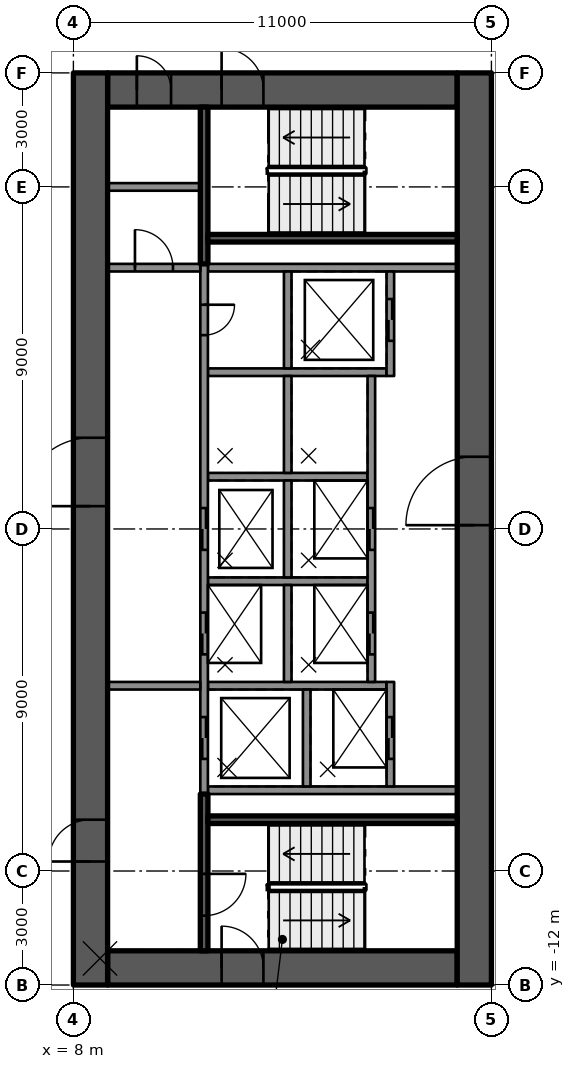
"""IFC4 building model, lengths in metres.
Left out: names, types, materials, properties, quantities, classifications, styles, units other than length and angle.
Written with IfcOpenShell. Run it as: python <this file> out.ifc"""

import sys

from ifc_helpers import new_model, si_unit, direction, frame, frame_2d, origin, place, context, subcontext, project, spatial, rectangle, extrude, element, fill, save


model = new_model("IFC4")
c1 = context("Model", 3, precision=1e-05, world=origin(), true_north=direction((0.0, 1.0)))
c2 = subcontext(c1, "Body", "Model", "MODEL_VIEW")
j1 = project(units=[si_unit("LENGTHUNIT", "METRE"), si_unit("PLANEANGLEUNIT", "RADIAN")], contexts=[c1])
p1 = place(None, origin())
s1 = spatial("IfcSite", under=j1, at=p1, CompositionType="ELEMENT")
p2 = place(p1, origin())
s2 = spatial("IfcBuilding", under=s1, at=p2, CompositionType="ELEMENT")
p3 = place(p2, frame((0.0, 0.0, 62.3)))
s3 = spatial("IfcBuildingStorey", under=s2, at=p3, CompositionType="ELEMENT", Elevation=62.3)
p4 = place(p3, frame((8.9, 11.55, 0.0), z_axis=(0.0, 0.0, 1.0), x_axis=(1.0, 0.0, 0.0)))
e1 = element("IfcWall", 1, at=p4, inside=s3, PredefinedType="SHEAR", context=c2, shape_type="SweptSolid", body=[
    extrude(rectangle(XDim=9.2, YDim=0.9, at=frame_2d((4.6, 0.0))), origin(), (0.0, 0.0, 1.0), 3.5),
])
p5 = place(p4, frame((3.0, 0.0, 0.0)))
e2 = element("IfcOpeningElement", 2, at=p5, cuts=e1, PredefinedType="OPENING", context=c2, shape_type="SweptSolid", body=[
    extrude(rectangle(XDim=1.1, YDim=2.1, at=frame_2d((0.55, 1.05))), frame((0.0, 0.46, 0.0), z_axis=(0.0, -1.0, 0.0), x_axis=(1.0, 0.0, 0.0)), (0.0, 0.0, 1.0), 0.92),
])
p6 = place(p4, frame((0.77, 0.0, 0.0)))
e3 = element("IfcOpeningElement", 3, at=p6, cuts=e1, PredefinedType="OPENING", context=c2, shape_type="SweptSolid", body=[
    extrude(rectangle(XDim=0.9, YDim=2.1, at=frame_2d((0.45, 1.05))), frame((0.0, 0.46, 0.0), z_axis=(0.0, -1.0, 0.0), x_axis=(1.0, 0.0, 0.0)), (0.0, 0.0, 1.0), 0.92),
])
p7 = place(p3, frame((8.9, -11.55, 0.0), z_axis=(0.0, 0.0, 1.0), x_axis=(1.0, 0.0, 0.0)))
e4 = element("IfcWall", 4, at=p7, inside=s3, PredefinedType="SHEAR", context=c2, shape_type="SweptSolid", body=[
    extrude(rectangle(XDim=9.2, YDim=0.9, at=frame_2d((4.6, 0.0))), origin(), (0.0, 0.0, 1.0), 3.5),
])
p8 = place(p7, frame((3.0, 0.0, 0.0)))
e5 = element("IfcOpeningElement", 5, at=p8, cuts=e4, PredefinedType="OPENING", context=c2, shape_type="SweptSolid", body=[
    extrude(rectangle(XDim=1.1, YDim=2.1, at=frame_2d((0.55, 1.05))), frame((0.0, 0.46, 0.0), z_axis=(0.0, -1.0, 0.0), x_axis=(1.0, 0.0, 0.0)), (0.0, 0.0, 1.0), 0.92),
])
p9 = place(p3, frame((8.45, -12.0, 0.0), z_axis=(0.0, 0.0, 1.0), x_axis=(0.0, 1.0, 0.0)))
e6 = element("IfcWall", 6, at=p9, inside=s3, PredefinedType="SHEAR", context=c2, shape_type="SweptSolid", body=[
    extrude(rectangle(XDim=24.0, YDim=0.9, at=frame_2d((12.0, 0.0))), origin(), (0.0, 0.0, 1.0), 3.5),
])
p10 = place(p9, frame((12.6, 0.0, 0.0)))
e7 = element("IfcOpeningElement", 7, at=p10, cuts=e6, PredefinedType="OPENING", context=c2, shape_type="SweptSolid", body=[
    extrude(rectangle(XDim=1.8, YDim=2.1, at=frame_2d((0.9, 1.05))), frame((0.0, 0.46, 0.0), z_axis=(0.0, -1.0, 0.0), x_axis=(1.0, 0.0, 0.0)), (0.0, 0.0, 1.0), 0.92),
])
p11 = place(p9, frame((3.25, 0.0, 0.0)))
e8 = element("IfcOpeningElement", 8, at=p11, cuts=e6, PredefinedType="OPENING", context=c2, shape_type="SweptSolid", body=[
    extrude(rectangle(XDim=1.1, YDim=2.1, at=frame_2d((0.55, 1.05))), frame((0.0, 0.46, 0.0), z_axis=(0.0, -1.0, 0.0), x_axis=(1.0, 0.0, 0.0)), (0.0, 0.0, 1.0), 0.92),
])
p12 = place(p3, frame((18.55, -12.0, 0.0), z_axis=(0.0, 0.0, 1.0), x_axis=(0.0, 1.0, 0.0)))
e9 = element("IfcWall", 9, at=p12, inside=s3, PredefinedType="SHEAR", context=c2, shape_type="SweptSolid", body=[
    extrude(rectangle(XDim=24.0, YDim=0.9, at=frame_2d((12.0, 0.0))), origin(), (0.0, 0.0, 1.0), 3.5),
])
p13 = place(p12, frame((12.1, 0.0, 0.0)))
e10 = element("IfcOpeningElement", 10, at=p13, cuts=e9, PredefinedType="OPENING", context=c2, shape_type="SweptSolid", body=[
    extrude(rectangle(XDim=1.8, YDim=2.1, at=frame_2d((0.9, 1.05))), frame((0.0, 0.46, 0.0), z_axis=(0.0, -1.0, 0.0), x_axis=(1.0, 0.0, 0.0)), (0.0, 0.0, 1.0), 0.92),
])
for number, where, z_axis, x_axis in (
    (11, (11.54, -6.875, 0.0), (0.0, 0.0, 1.0), (1.0, 0.0, 0.0)),
    (12, (11.54, 6.875, 0.0), (0.0, 0.0, 1.0), (1.0, 0.0, 0.0)),
):
    element("IfcWall", number, at=place(p3, frame(where, z_axis=z_axis, x_axis=x_axis)), inside=s3, PredefinedType="SOLIDWALL", context=c2, shape_type="SweptSolid", body=[
        extrude(rectangle(XDim=6.56, YDim=0.2, at=frame_2d((3.28, 0.0))), origin(), (0.0, 0.0, 1.0), 3.09),
    ])
p14 = place(p3, frame((11.54, 4.125, 0.0), z_axis=(0.0, 0.0, 1.0), x_axis=(1.0, 0.0, 0.0)))
e13 = element("IfcWall", 13, at=p14, inside=s3, PredefinedType="SOLIDWALL", context=c2, shape_type="SweptSolid", body=[
    extrude(rectangle(XDim=4.7, YDim=0.2, at=frame_2d((2.35, 0.0))), origin(), (0.0, 0.0, 1.0), 3.09),
])
for number, where, z_axis, x_axis in (
    (14, (11.54, 1.375, 0.0), (0.0, 0.0, 1.0), (1.0, 0.0, 0.0)),
    (15, (11.54, -1.375, 0.0), (0.0, 0.0, 1.0), (1.0, 0.0, 0.0)),
):
    element("IfcWall", number, at=place(p3, frame(where, z_axis=z_axis, x_axis=x_axis)), inside=s3, PredefinedType="SOLIDWALL", context=c2, shape_type="SweptSolid", body=[
        extrude(rectangle(XDim=4.2, YDim=0.2, at=frame_2d((2.1, 0.0))), origin(), (0.0, 0.0, 1.0), 3.09),
    ])
p15 = place(p3, frame((11.54, -4.125, 0.0), z_axis=(0.0, 0.0, 1.0), x_axis=(1.0, 0.0, 0.0)))
e16 = element("IfcWall", 16, at=p15, inside=s3, PredefinedType="SOLIDWALL", context=c2, shape_type="SweptSolid", body=[
    extrude(rectangle(XDim=4.7, YDim=0.2, at=frame_2d((2.35, 0.0))), origin(), (0.0, 0.0, 1.0), 3.09),
])
p16 = place(p3, frame((11.44, 6.975, 0.0), z_axis=(0.0, 0.0, 1.0), x_axis=(0.0, -1.0, 0.0)))
e17 = element("IfcWall", 17, at=p16, inside=s3, PredefinedType="SOLIDWALL", context=c2, shape_type="SweptSolid", body=[
    extrude(rectangle(XDim=13.95, YDim=0.2, at=frame_2d((6.975, 0.0))), origin(), (0.0, 0.0, 1.0), 3.09),
])
p17 = place(p16, frame((6.425, 0.0, 0.0)))
e18 = element("IfcOpeningElement", 18, at=p17, cuts=e17, PredefinedType="OPENING", context=c2, shape_type="SweptSolid", body=[
    extrude(rectangle(XDim=1.1, YDim=2.1, at=frame_2d((0.55, 1.05))), frame((0.0, 0.11, 0.0), z_axis=(0.0, -1.0, 0.0), x_axis=(1.0, 0.0, 0.0)), (0.0, 0.0, 1.0), 0.22),
])
p18 = place(p16, frame((9.175, 0.0, 0.0)))
e19 = element("IfcOpeningElement", 19, at=p18, cuts=e17, PredefinedType="OPENING", context=c2, shape_type="SweptSolid", body=[
    extrude(rectangle(XDim=1.1, YDim=2.1, at=frame_2d((0.55, 1.05))), frame((0.0, 0.11, 0.0), z_axis=(0.0, -1.0, 0.0), x_axis=(1.0, 0.0, 0.0)), (0.0, 0.0, 1.0), 0.22),
])
p19 = place(p16, frame((11.925, 0.0, 0.0)))
e20 = element("IfcOpeningElement", 20, at=p19, cuts=e17, PredefinedType="OPENING", context=c2, shape_type="SweptSolid", body=[
    extrude(rectangle(XDim=1.1, YDim=2.1, at=frame_2d((0.55, 1.05))), frame((0.0, 0.11, 0.0), z_axis=(0.0, -1.0, 0.0), x_axis=(1.0, 0.0, 0.0)), (0.0, 0.0, 1.0), 0.22),
])
p20 = place(p16, frame((1.075, 0.0, 0.0)))
e21 = element("IfcOpeningElement", 21, at=p20, cuts=e17, PredefinedType="OPENING", context=c2, shape_type="SweptSolid", body=[
    extrude(rectangle(XDim=0.8, YDim=2.1, at=frame_2d((0.4, 1.05))), frame((0.0, 0.11, 0.0), z_axis=(0.0, -1.0, 0.0), x_axis=(1.0, 0.0, 0.0)), (0.0, 0.0, 1.0), 0.22),
])
for number, where, z_axis, x_axis in (
    (22, (13.64, 6.775, 0.0), (0.0, 0.0, 1.0), (0.0, -1.0, 0.0)),
    (23, (13.64, 4.025, 0.0), (0.0, 0.0, 1.0), (0.0, -1.0, 0.0)),
    (24, (13.64, 1.275, 0.0), (0.0, 0.0, 1.0), (0.0, -1.0, 0.0)),
    (25, (13.64, -1.475, 0.0), (0.0, 0.0, 1.0), (0.0, -1.0, 0.0)),
    (26, (14.14, -4.225, 0.0), (0.0, 0.0, 1.0), (0.0, -1.0, 0.0)),
):
    element("IfcWall", number, at=place(p3, frame(where, z_axis=z_axis, x_axis=x_axis)), inside=s3, PredefinedType="SOLIDWALL", context=c2, shape_type="SweptSolid", body=[
        extrude(rectangle(XDim=2.55, YDim=0.2, at=frame_2d((1.275, 0.0))), origin(), (0.0, 0.0, 1.0), 3.09),
    ])
p21 = place(p3, frame((16.34, 6.775, 0.0), z_axis=(0.0, 0.0, 1.0), x_axis=(0.0, -1.0, 0.0)))
e27 = element("IfcWall", 27, at=p21, inside=s3, PredefinedType="SOLIDWALL", context=c2, shape_type="SweptSolid", body=[
    extrude(rectangle(XDim=2.75, YDim=0.2, at=frame_2d((1.375, 0.0))), origin(), (0.0, 0.0, 1.0), 3.09),
])
p22 = place(p21, frame((0.725, 0.0, 0.0)))
e28 = element("IfcOpeningElement", 28, at=p22, cuts=e27, PredefinedType="OPENING", context=c2, shape_type="SweptSolid", body=[
    extrude(rectangle(XDim=1.1, YDim=2.1, at=frame_2d((0.55, 1.05))), frame((0.0, 0.11, 0.0), z_axis=(0.0, -1.0, 0.0), x_axis=(1.0, 0.0, 0.0)), (0.0, 0.0, 1.0), 0.22),
])
p23 = place(p3, frame((15.84, 4.025, 0.0), z_axis=(0.0, 0.0, 1.0), x_axis=(0.0, -1.0, 0.0)))
e29 = element("IfcWall", 29, at=p23, inside=s3, PredefinedType="SOLIDWALL", context=c2, shape_type="SweptSolid", body=[
    extrude(rectangle(XDim=8.05, YDim=0.2, at=frame_2d((4.025, 0.0))), origin(), (0.0, 0.0, 1.0), 3.09),
])
p24 = place(p23, frame((3.475, 0.0, 0.0)))
e30 = element("IfcOpeningElement", 30, at=p24, cuts=e29, PredefinedType="OPENING", context=c2, shape_type="SweptSolid", body=[
    extrude(rectangle(XDim=1.1, YDim=2.1, at=frame_2d((0.55, 1.05))), frame((0.0, 0.11, 0.0), z_axis=(0.0, -1.0, 0.0), x_axis=(1.0, 0.0, 0.0)), (0.0, 0.0, 1.0), 0.22),
])
p25 = place(p23, frame((6.225, 0.0, 0.0)))
e31 = element("IfcOpeningElement", 31, at=p25, cuts=e29, PredefinedType="OPENING", context=c2, shape_type="SweptSolid", body=[
    extrude(rectangle(XDim=1.1, YDim=2.1, at=frame_2d((0.55, 1.05))), frame((0.0, 0.11, 0.0), z_axis=(0.0, -1.0, 0.0), x_axis=(1.0, 0.0, 0.0)), (0.0, 0.0, 1.0), 0.22),
])
p26 = place(p3, frame((16.34, -4.025, 0.0), z_axis=(0.0, 0.0, 1.0), x_axis=(0.0, -1.0, 0.0)))
e32 = element("IfcWall", 32, at=p26, inside=s3, PredefinedType="SOLIDWALL", context=c2, shape_type="SweptSolid", body=[
    extrude(rectangle(XDim=2.75, YDim=0.2, at=frame_2d((1.375, 0.0))), origin(), (0.0, 0.0, 1.0), 3.09),
])
p27 = place(p26, frame((0.925, 0.0, 0.0)))
e33 = element("IfcOpeningElement", 33, at=p27, cuts=e32, PredefinedType="OPENING", context=c2, shape_type="SweptSolid", body=[
    extrude(rectangle(XDim=1.1, YDim=2.1, at=frame_2d((0.55, 1.05))), frame((0.0, 0.11, 0.0), z_axis=(0.0, -1.0, 0.0), x_axis=(1.0, 0.0, 0.0)), (0.0, 0.0, 1.0), 0.22),
])
p28 = place(p3, frame((11.44, -6.975, 0.0), z_axis=(0.0, 0.0, 1.0), x_axis=(0.0, -1.0, 0.0)))
e34 = element("IfcWall", 34, at=p28, inside=s3, PredefinedType="SOLIDWALL", context=c2, shape_type="SweptSolid", body=[
    extrude(rectangle(XDim=4.125, YDim=0.2, at=frame_2d((2.062, 0.0))), origin(), (0.0, 0.0, 1.0), 3.09),
])
p29 = place(p28, frame((2.1, 0.0, 0.0)))
e35 = element("IfcOpeningElement", 35, at=p29, cuts=e34, PredefinedType="OPENING", context=c2, shape_type="SweptSolid", body=[
    extrude(rectangle(XDim=1.1, YDim=2.1, at=frame_2d((0.55, 1.05))), frame((0.0, 0.11, 0.0), z_axis=(0.0, -1.0, 0.0), x_axis=(1.0, 0.0, 0.0)), (0.0, 0.0, 1.0), 0.22),
])
p30 = place(p3, frame((11.54, -7.65, 0.0), z_axis=(0.0, 0.0, 1.0), x_axis=(1.0, 0.0, 0.0)))
e36 = element("IfcWall", 36, at=p30, inside=s3, PredefinedType="SOLIDWALL", context=c2, shape_type="SweptSolid", body=[
    extrude(rectangle(XDim=6.56, YDim=0.2, at=frame_2d((3.28, 0.0))), origin(), (0.0, 0.0, 1.0), 3.09),
])
p31 = place(p3, frame((11.44, 11.1, 0.0), z_axis=(0.0, 0.0, 1.0), x_axis=(0.0, -1.0, 0.0)))
e37 = element("IfcWall", 37, at=p31, inside=s3, PredefinedType="SOLIDWALL", context=c2, shape_type="SweptSolid", body=[
    extrude(rectangle(XDim=4.125, YDim=0.2, at=frame_2d((2.062, 0.0))), origin(), (0.0, 0.0, 1.0), 3.09),
])
p32 = place(p3, frame((11.54, 7.65, 0.0), z_axis=(0.0, 0.0, 1.0), x_axis=(1.0, 0.0, 0.0)))
e38 = element("IfcWall", 38, at=p32, inside=s3, PredefinedType="SOLIDWALL", context=c2, shape_type="SweptSolid", body=[
    extrude(rectangle(XDim=6.56, YDim=0.2, at=frame_2d((3.28, 0.0))), origin(), (0.0, 0.0, 1.0), 3.09),
])
p33 = place(p3, frame((8.9, -4.125, 0.0), z_axis=(0.0, 0.0, 1.0), x_axis=(1.0, 0.0, 0.0)))
e39 = element("IfcWall", 39, at=p33, inside=s3, PredefinedType="PARTITIONING", context=c2, shape_type="SweptSolid", body=[
    extrude(rectangle(XDim=2.44, YDim=0.2, at=frame_2d((1.22, 0.0))), origin(), (0.0, 0.0, 1.0), 3.09),
])
p34 = place(p3, frame((8.9, 6.875, 0.0), z_axis=(0.0, 0.0, 1.0), x_axis=(1.0, 0.0, 0.0)))
e40 = element("IfcWall", 40, at=p34, inside=s3, PredefinedType="PARTITIONING", context=c2, shape_type="SweptSolid", body=[
    extrude(rectangle(XDim=2.44, YDim=0.2, at=frame_2d((1.22, 0.0))), origin(), (0.0, 0.0, 1.0), 3.09),
])
p35 = place(p34, frame((0.72, 0.0, 0.0)))
e41 = element("IfcOpeningElement", 41, at=p35, cuts=e40, PredefinedType="OPENING", context=c2, shape_type="SweptSolid", body=[
    extrude(rectangle(XDim=1.0, YDim=2.1, at=frame_2d((0.5, 1.05))), frame((0.0, 0.11, 0.0), z_axis=(0.0, -1.0, 0.0), x_axis=(1.0, 0.0, 0.0)), (0.0, 0.0, 1.0), 0.22),
])
p36 = place(p3, frame((8.9, 9.0, 0.0), z_axis=(0.0, 0.0, 1.0), x_axis=(1.0, 0.0, 0.0)))
e42 = element("IfcWall", 42, at=p36, inside=s3, PredefinedType="PARTITIONING", context=c2, shape_type="SweptSolid", body=[
    extrude(rectangle(XDim=2.44, YDim=0.2, at=frame_2d((1.22, 0.0))), origin(), (0.0, 0.0, 1.0), 3.09),
])
p37 = place(p22, origin())
e43 = element("IfcDoor", 43, at=p37, inside=s3, OperationType="DOUBLE_DOOR_SLIDING", PredefinedType="DOOR", context=c2, shape_type="SweptSolid", body=[
    extrude(rectangle(XDim=1.1, YDim=2.1, at=frame_2d((0.55, 1.05))), frame((0.0, 0.025, 0.0), z_axis=(0.0, -1.0, 0.0), x_axis=(1.0, 0.0, 0.0)), (0.0, 0.0, 1.0), 0.05),
])
fill(e28, e43)
p38 = place(p17, origin())
e44 = element("IfcDoor", 44, at=p38, inside=s3, OperationType="DOUBLE_DOOR_SLIDING", PredefinedType="DOOR", context=c2, shape_type="SweptSolid", body=[
    extrude(rectangle(XDim=1.1, YDim=2.1, at=frame_2d((0.55, 1.05))), frame((0.0, 0.025, 0.0), z_axis=(0.0, -1.0, 0.0), x_axis=(1.0, 0.0, 0.0)), (0.0, 0.0, 1.0), 0.05),
])
fill(e18, e44)
p39 = place(p24, origin())
e45 = element("IfcDoor", 45, at=p39, inside=s3, OperationType="DOUBLE_DOOR_SLIDING", PredefinedType="DOOR", context=c2, shape_type="SweptSolid", body=[
    extrude(rectangle(XDim=1.1, YDim=2.1, at=frame_2d((0.55, 1.05))), frame((0.0, 0.025, 0.0), z_axis=(0.0, -1.0, 0.0), x_axis=(1.0, 0.0, 0.0)), (0.0, 0.0, 1.0), 0.05),
])
fill(e30, e45)
p40 = place(p18, origin())
e46 = element("IfcDoor", 46, at=p40, inside=s3, OperationType="DOUBLE_DOOR_SLIDING", PredefinedType="DOOR", context=c2, shape_type="SweptSolid", body=[
    extrude(rectangle(XDim=1.1, YDim=2.1, at=frame_2d((0.55, 1.05))), frame((0.0, 0.025, 0.0), z_axis=(0.0, -1.0, 0.0), x_axis=(1.0, 0.0, 0.0)), (0.0, 0.0, 1.0), 0.05),
])
fill(e19, e46)
p41 = place(p25, origin())
e47 = element("IfcDoor", 47, at=p41, inside=s3, OperationType="DOUBLE_DOOR_SLIDING", PredefinedType="DOOR", context=c2, shape_type="SweptSolid", body=[
    extrude(rectangle(XDim=1.1, YDim=2.1, at=frame_2d((0.55, 1.05))), frame((0.0, 0.025, 0.0), z_axis=(0.0, -1.0, 0.0), x_axis=(1.0, 0.0, 0.0)), (0.0, 0.0, 1.0), 0.05),
])
fill(e31, e47)
p42 = place(p19, origin())
e48 = element("IfcDoor", 48, at=p42, inside=s3, OperationType="DOUBLE_DOOR_SLIDING", PredefinedType="DOOR", context=c2, shape_type="SweptSolid", body=[
    extrude(rectangle(XDim=1.1, YDim=2.1, at=frame_2d((0.55, 1.05))), frame((0.0, 0.025, 0.0), z_axis=(0.0, -1.0, 0.0), x_axis=(1.0, 0.0, 0.0)), (0.0, 0.0, 1.0), 0.05),
])
fill(e20, e48)
p43 = place(p27, origin())
e49 = element("IfcDoor", 49, at=p43, inside=s3, OperationType="DOUBLE_DOOR_SLIDING", PredefinedType="DOOR", context=c2, shape_type="SweptSolid", body=[
    extrude(rectangle(XDim=1.1, YDim=2.1, at=frame_2d((0.55, 1.05))), frame((0.0, 0.025, 0.0), z_axis=(0.0, -1.0, 0.0), x_axis=(1.0, 0.0, 0.0)), (0.0, 0.0, 1.0), 0.05),
])
fill(e33, e49)
p44 = place(p20, origin())
e50 = element("IfcDoor", 50, at=p44, inside=s3, OperationType="SINGLE_SWING_LEFT", PredefinedType="DOOR", context=c2, shape_type="SweptSolid", body=[
    extrude(rectangle(XDim=0.8, YDim=2.1, at=frame_2d((0.4, 1.05))), frame((0.0, 0.025, 0.0), z_axis=(0.0, -1.0, 0.0), x_axis=(1.0, 0.0, 0.0)), (0.0, 0.0, 1.0), 0.05),
])
fill(e21, e50)
p45 = place(p10, origin())
e51 = element("IfcDoor", 51, at=p45, inside=s3, OperationType="SINGLE_SWING_RIGHT", PredefinedType="DOOR", context=c2, shape_type="SweptSolid", body=[
    extrude(rectangle(XDim=1.8, YDim=2.1, at=frame_2d((0.9, 1.05))), frame((0.0, 0.025, 0.0), z_axis=(0.0, -1.0, 0.0), x_axis=(1.0, 0.0, 0.0)), (0.0, 0.0, 1.0), 0.05),
])
fill(e7, e51)
p46 = place(p13, origin())
e52 = element("IfcDoor", 52, at=p46, inside=s3, OperationType="SINGLE_SWING_RIGHT", PredefinedType="DOOR", context=c2, shape_type="SweptSolid", body=[
    extrude(rectangle(XDim=1.8, YDim=2.1, at=frame_2d((0.9, 1.05))), frame((0.0, 0.025, 0.0), z_axis=(0.0, -1.0, 0.0), x_axis=(1.0, 0.0, 0.0)), (0.0, 0.0, 1.0), 0.05),
])
fill(e10, e52)
p47 = place(p11, origin())
e53 = element("IfcDoor", 53, at=p47, inside=s3, OperationType="SINGLE_SWING_LEFT", PredefinedType="DOOR", context=c2, shape_type="SweptSolid", body=[
    extrude(rectangle(XDim=1.1, YDim=2.1, at=frame_2d((0.55, 1.05))), frame((0.0, 0.025, 0.0), z_axis=(0.0, -1.0, 0.0), x_axis=(1.0, 0.0, 0.0)), (0.0, 0.0, 1.0), 0.05),
])
fill(e8, e53)
p48 = place(p8, origin())
e54 = element("IfcDoor", 54, at=p48, inside=s3, OperationType="SINGLE_SWING_LEFT", PredefinedType="DOOR", context=c2, shape_type="SweptSolid", body=[
    extrude(rectangle(XDim=1.1, YDim=2.1, at=frame_2d((0.55, 1.05))), frame((0.0, 0.025, 0.0), z_axis=(0.0, -1.0, 0.0), x_axis=(1.0, 0.0, 0.0)), (0.0, 0.0, 1.0), 0.05),
])
fill(e5, e54)
p49 = place(p5, origin())
e55 = element("IfcDoor", 55, at=p49, inside=s3, OperationType="SINGLE_SWING_LEFT", PredefinedType="DOOR", context=c2, shape_type="SweptSolid", body=[
    extrude(rectangle(XDim=1.1, YDim=2.1, at=frame_2d((0.55, 1.05))), frame((0.0, 0.025, 0.0), z_axis=(0.0, -1.0, 0.0), x_axis=(1.0, 0.0, 0.0)), (0.0, 0.0, 1.0), 0.05),
])
fill(e2, e55)
p50 = place(p29, origin())
e56 = element("IfcDoor", 56, at=p50, inside=s3, OperationType="SINGLE_SWING_RIGHT", PredefinedType="DOOR", context=c2, shape_type="SweptSolid", body=[
    extrude(rectangle(XDim=1.1, YDim=2.1, at=frame_2d((0.55, 1.05))), frame((0.0, 0.025, 0.0), z_axis=(0.0, -1.0, 0.0), x_axis=(1.0, 0.0, 0.0)), (0.0, 0.0, 1.0), 0.05),
])
fill(e35, e56)
p51 = place(p6, origin())
e57 = element("IfcDoor", 57, at=p51, inside=s3, OperationType="SINGLE_SWING_LEFT", PredefinedType="DOOR", context=c2, shape_type="SweptSolid", body=[
    extrude(rectangle(XDim=0.9, YDim=2.1, at=frame_2d((0.45, 1.05))), frame((0.0, 0.025, 0.0), z_axis=(0.0, -1.0, 0.0), x_axis=(1.0, 0.0, 0.0)), (0.0, 0.0, 1.0), 0.05),
])
fill(e3, e57)
p52 = place(p35, origin())
e58 = element("IfcDoor", 58, at=p52, inside=s3, OperationType="SINGLE_SWING_RIGHT", PredefinedType="DOOR", context=c2, shape_type="SweptSolid", body=[
    extrude(rectangle(XDim=1.0, YDim=2.1, at=frame_2d((0.5, 1.05))), frame((0.0, 0.025, 0.0), z_axis=(0.0, -1.0, 0.0), x_axis=(1.0, 0.0, 0.0)), (0.0, 0.0, 1.0), 0.05),
])
fill(e41, e58)
save(model, sys.argv[1])
